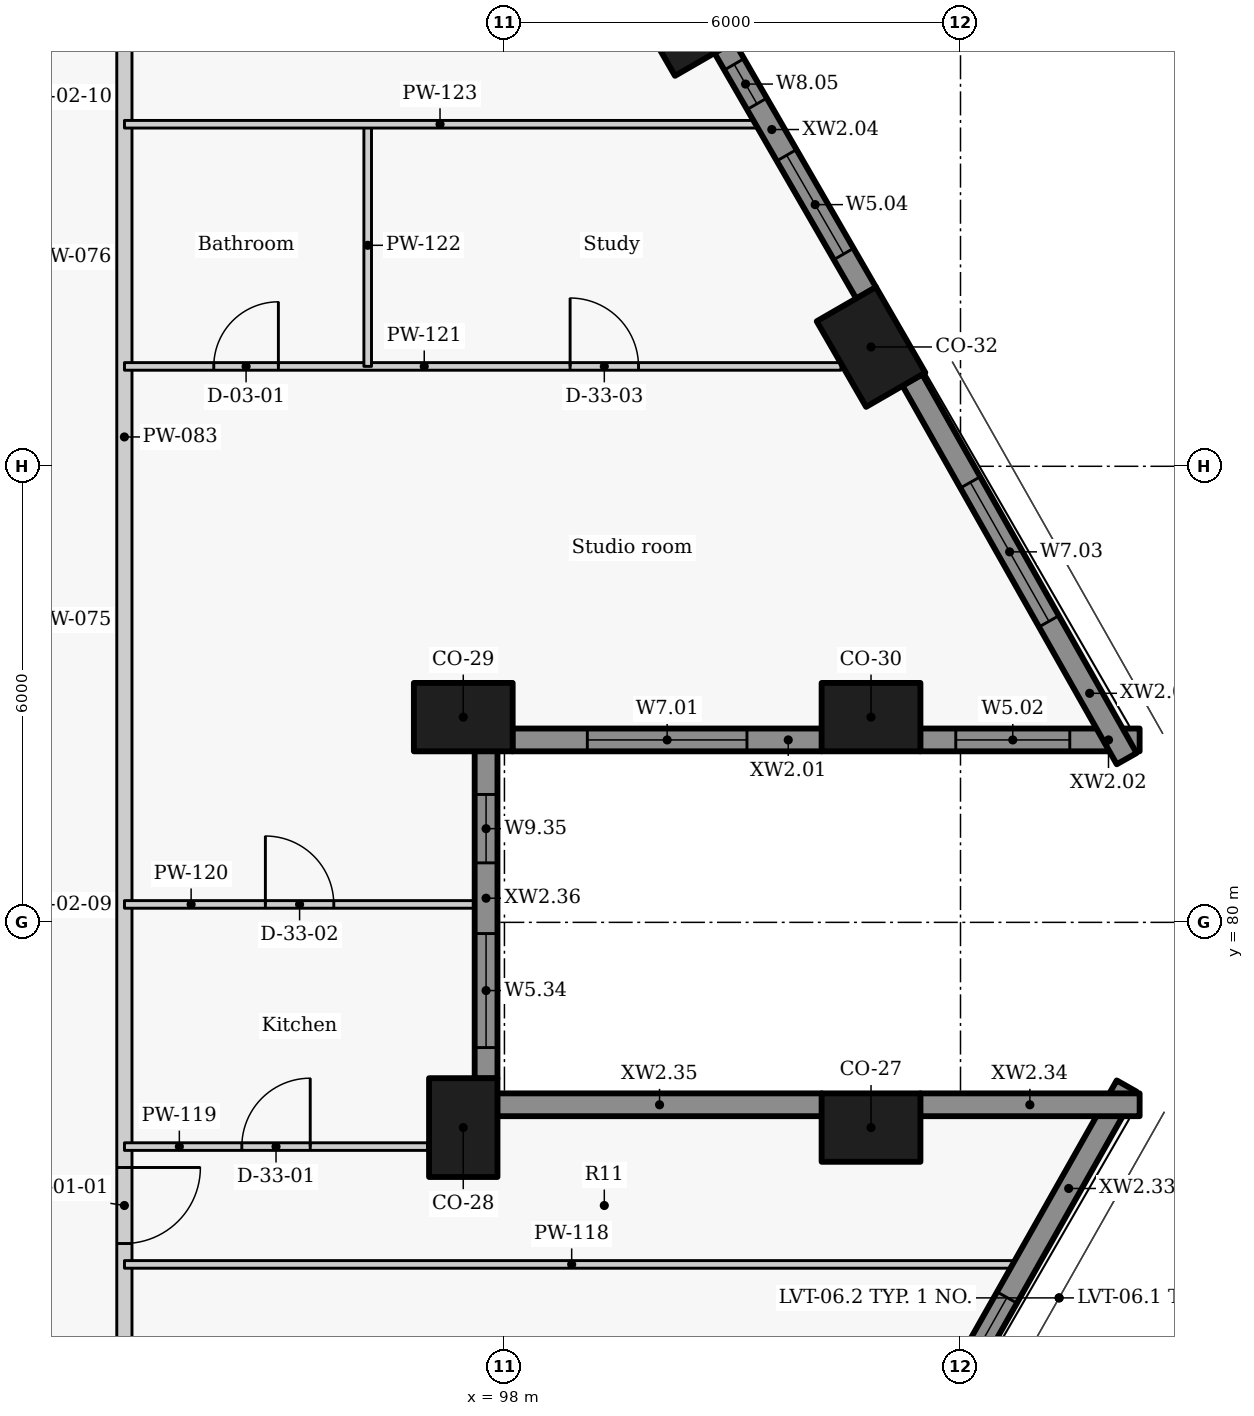
"""IFC4 building model, lengths in metres.
Left out: names, types, materials, properties, quantities, classifications, styles, units other than length and angle.
Written with IfcOpenShell. Run it as: python <this file> out.ifc"""

import sys

from ifc_helpers import new_model, si_unit, direction, frame, frame_2d, origin, origin_2d, place, context, subcontext, project, spatial, rectangle, extrude, element, fill, save


model = new_model("IFC4")
c1 = context("Model", 3, precision=1e-05, world=origin(), true_north=direction((0.0, 1.0)))
c2 = subcontext(c1, "Body", "Model", "MODEL_VIEW")
j1 = project(units=[si_unit("LENGTHUNIT", "METRE"), si_unit("PLANEANGLEUNIT", "RADIAN")], contexts=[c1])
p1 = place(None, origin())
s1 = spatial("IfcSite", under=j1, at=p1, CompositionType="ELEMENT")
p2 = place(p1, origin())
s2 = spatial("IfcBuilding", under=s1, at=p2, CompositionType="ELEMENT")
p3 = place(p2, frame((0.0, 0.0, 140.4)))
s3 = spatial("IfcBuildingStorey", under=s2, at=p3, CompositionType="ELEMENT", Elevation=140.4)
for number, where, z_axis, x_axis in (
    (1, (102.823, 77.3, 0.0), (0.0, 0.0, 1.0), (-1.0, 0.0, 0.0)),
    (2, (97.458, 77.3, 0.0), (0.0, 0.0, 1.0), (0.0, 1.0, 0.0)),
    (3, (97.458, 82.7, 0.0), (0.0, 0.0, 1.0), (1.0, 0.0, 0.0)),
    (4, (102.823, 82.7, 0.0), (0.0, 0.0, 1.0), (1.0, 0.0, 0.0)),
    (5, (102.823, 87.57, 0.0), (0.0, 0.0, 1.0), (-0.5, 0.866, 0.0)),
    (6, (100.308, 91.925, 0.0), (0.0, 0.0, 1.0), (-0.5, 0.866, 0.0)),
):
    element("IfcColumn", number, at=place(p3, frame(where, z_axis=z_axis, x_axis=x_axis)), inside=s3, PredefinedType="COLUMN", context=c2, shape_type="SweptSolid", body=[
        extrude(rectangle(XDim=1.3, YDim=0.9, at=origin_2d()), origin(), (0.0, 0.0, 1.0), 3.3),
    ])
p4 = place(p3, frame((98.104, 82.4, 0.0), z_axis=(0.0, 0.0, 1.0), x_axis=(1.0, 0.0, 0.0)))
e7 = element("IfcWall", 7, at=p4, inside=s3, PredefinedType="SOLIDWALL", context=c2, shape_type="SweptSolid", body=[
    extrude(rectangle(XDim=4.073, YDim=0.3, at=frame_2d((2.036, 0.0))), origin(), (0.0, 0.0, 1.0), 2.425),
])
p5 = place(p4, frame((0.986, 0.0, 0.9)))
e8 = element("IfcOpeningElement", 8, at=p5, cuts=e7, PredefinedType="OPENING", context=c2, shape_type="SweptSolid", body=[
    extrude(rectangle(XDim=2.1, YDim=1.1, at=frame_2d((1.05, 0.55))), frame((0.0, 0.16, 0.0), z_axis=(0.0, -1.0, 0.0), x_axis=(1.0, 0.0, 0.0)), (0.0, 0.0, 1.0), 0.32),
])
p6 = place(p3, frame((103.469, 82.4, 0.0), z_axis=(0.0, 0.0, 1.0), x_axis=(1.0, 0.0, 0.0)))
e9 = element("IfcWall", 9, at=p6, inside=s3, PredefinedType="SOLIDWALL", context=c2, shape_type="SweptSolid", body=[
    extrude(rectangle(XDim=2.888, YDim=0.3, at=frame_2d((1.444, 0.0))), origin(), (0.0, 0.0, 1.0), 2.425),
])
p7 = place(p6, frame((0.469, 0.0, 0.9)))
e10 = element("IfcOpeningElement", 10, at=p7, cuts=e9, PredefinedType="OPENING", context=c2, shape_type="SweptSolid", body=[
    extrude(rectangle(XDim=1.5, YDim=1.1, at=frame_2d((0.75, 0.55))), frame((0.0, 0.16, 0.0), z_axis=(0.0, -1.0, 0.0), x_axis=(1.0, 0.0, 0.0)), (0.0, 0.0, 1.0), 0.32),
])
p8 = place(p3, frame((106.186, 82.153, 0.0), z_axis=(0.0, 0.0, 1.0), x_axis=(-0.492498306264, 0.87031340236, 0.0)))
e11 = element("IfcWall", 11, at=p8, inside=s3, PredefinedType="SOLIDWALL", context=c2, shape_type="SweptSolid", body=[
    extrude(rectangle(XDim=5.727, YDim=0.3, at=frame_2d((2.863, 0.0))), origin(), (0.0, 0.0, 1.0), 2.425),
])
p9 = place(p8, frame((2.076, 0.0, 0.9)))
e12 = element("IfcOpeningElement", 12, at=p9, cuts=e11, PredefinedType="OPENING", context=c2, shape_type="SweptSolid", body=[
    extrude(rectangle(XDim=2.1, YDim=1.1, at=frame_2d((1.05, 0.55))), frame((0.0, 0.16, 0.0), z_axis=(0.0, -1.0, 0.0), x_axis=(1.0, 0.0, 0.0)), (0.0, 0.0, 1.0), 0.32),
])
p10 = place(p3, frame((102.76, 88.279, 0.0), z_axis=(0.0, 0.0, 1.0), x_axis=(-0.499933594891, 0.866063739398, 0.0)))
e13 = element("IfcWall", 13, at=p10, inside=s3, PredefinedType="SOLIDWALL", context=c2, shape_type="SweptSolid", body=[
    extrude(rectangle(XDim=3.737, YDim=0.3, at=frame_2d((1.868, 0.0))), origin(), (0.0, 0.0, 1.0), 2.425),
])
p11 = place(p10, frame((0.593, 0.0, 0.9)))
e14 = element("IfcOpeningElement", 14, at=p11, cuts=e13, PredefinedType="OPENING", context=c2, shape_type="SweptSolid", body=[
    extrude(rectangle(XDim=1.5, YDim=1.1, at=frame_2d((0.75, 0.55))), frame((0.0, 0.16, 0.0), z_axis=(0.0, -1.0, 0.0), x_axis=(1.0, 0.0, 0.0)), (0.0, 0.0, 1.0), 0.32),
])
p12 = place(p10, frame((2.875, 0.0, 0.9)))
e15 = element("IfcOpeningElement", 15, at=p12, cuts=e13, PredefinedType="OPENING", context=c2, shape_type="SweptSolid", body=[
    extrude(rectangle(XDim=0.6, YDim=1.1, at=frame_2d((0.3, 0.55))), frame((0.0, 0.16, 0.0), z_axis=(0.0, -1.0, 0.0), x_axis=(1.0, 0.0, 0.0)), (0.0, 0.0, 1.0), 0.32),
])
p13 = place(p3, frame((103.366, 72.863, 0.0), z_axis=(0.0, 0.0, 1.0), x_axis=(0.492498306264, 0.87031340236, 0.0)))
e16 = element("IfcWall", 16, at=p13, inside=s3, PredefinedType="SOLIDWALL", context=c2, shape_type="SweptSolid", body=[
    extrude(rectangle(XDim=5.727, YDim=0.3, at=frame_2d((2.863, 0.0))), origin(), (0.0, 0.0, 1.0), 2.425),
])
p14 = place(p13, frame((0.43, 0.0, 0.9)))
e17 = element("IfcOpeningElement", 17, at=p14, cuts=e16, PredefinedType="OPENING", context=c2, shape_type="SweptSolid", body=[
    extrude(rectangle(XDim=2.1, YDim=1.1, at=frame_2d((1.05, 0.55))), frame((0.0, 0.16, 0.0), z_axis=(0.0, -1.0, 0.0), x_axis=(1.0, 0.0, 0.0)), (0.0, 0.0, 1.0), 0.32),
])
p15 = place(p3, frame((106.357, 77.6, 0.0), z_axis=(0.0, 0.0, 1.0), x_axis=(-1.0, 0.0, 0.0)))
e18 = element("IfcWall", 18, at=p15, inside=s3, PredefinedType="SOLIDWALL", context=c2, shape_type="SweptSolid", body=[
    extrude(rectangle(XDim=2.888, YDim=0.3, at=frame_2d((1.444, 0.0))), origin(), (0.0, 0.0, 1.0), 2.425),
])
p16 = place(p3, frame((102.177, 77.6, 0.0), z_axis=(0.0, 0.0, 1.0), x_axis=(-1.0, 0.0, 0.0)))
e19 = element("IfcWall", 19, at=p16, inside=s3, PredefinedType="SOLIDWALL", context=c2, shape_type="SweptSolid", body=[
    extrude(rectangle(XDim=4.273, YDim=0.3, at=frame_2d((2.136, 0.0))), origin(), (0.0, 0.0, 1.0), 2.425),
])
p17 = place(p3, frame((97.758, 77.946, 0.0), z_axis=(0.0, 0.0, 1.0), x_axis=(0.0, 1.0, 0.0)))
e20 = element("IfcWall", 20, at=p17, inside=s3, PredefinedType="SOLIDWALL", context=c2, shape_type="SweptSolid", body=[
    extrude(rectangle(XDim=4.308, YDim=0.3, at=frame_2d((2.154, 0.0))), origin(), (0.0, 0.0, 1.0), 2.425),
])
p18 = place(p17, frame((0.407, 0.0, 0.9)))
e21 = element("IfcOpeningElement", 21, at=p18, cuts=e20, PredefinedType="OPENING", context=c2, shape_type="SweptSolid", body=[
    extrude(rectangle(XDim=1.5, YDim=1.1, at=frame_2d((0.75, 0.55))), frame((0.0, 0.16, 0.0), z_axis=(0.0, -1.0, 0.0), x_axis=(1.0, 0.0, 0.0)), (0.0, 0.0, 1.0), 0.32),
])
p19 = place(p17, frame((2.837, 0.0, 0.9)))
e22 = element("IfcOpeningElement", 22, at=p19, cuts=e20, PredefinedType="OPENING", context=c2, shape_type="SweptSolid", body=[
    extrude(rectangle(XDim=0.9, YDim=1.1, at=frame_2d((0.45, 0.55))), frame((0.0, 0.16, 0.0), z_axis=(0.0, -1.0, 0.0), x_axis=(1.0, 0.0, 0.0)), (0.0, 0.0, 1.0), 0.32),
])
p20 = place(p3, frame((93.0, 102.498, 0.0), z_axis=(0.0, 0.0, 1.0), x_axis=(0.0, -1.0, 0.0)))
e23 = element("IfcWall", 23, at=p20, inside=s3, PredefinedType="PARTITIONING", context=c2, shape_type="SweptSolid", body=[
    extrude(rectangle(XDim=45.665, YDim=0.2, at=frame_2d((22.833, 0.0))), origin(), (0.0, 0.0, 1.0), 2.405),
])
p21 = place(p20, frame((35.831, 0.0, 0.0)))
e24 = element("IfcOpeningElement", 24, at=p21, cuts=e23, PredefinedType="OPENING", context=c2, shape_type="SweptSolid", body=[
    extrude(rectangle(XDim=1.0, YDim=2.1, at=frame_2d((0.5, 1.05))), frame((0.0, 0.11, 0.0), z_axis=(0.0, -1.0, 0.0), x_axis=(1.0, 0.0, 0.0)), (0.0, 0.0, 1.0), 0.22),
])
p22 = place(p20, frame((25.723, 0.0, 0.0)))
e25 = element("IfcOpeningElement", 25, at=p22, cuts=e23, PredefinedType="OPENING", context=c2, shape_type="SweptSolid", body=[
    extrude(rectangle(XDim=1.0, YDim=2.1, at=frame_2d((0.5, 1.05))), frame((0.0, 0.11, 0.0), z_axis=(0.0, -1.0, 0.0), x_axis=(1.0, 0.0, 0.0)), (0.0, 0.0, 1.0), 0.22),
])
p23 = place(p20, frame((5.501, 0.0, 0.0)))
e26 = element("IfcOpeningElement", 26, at=p23, cuts=e23, PredefinedType="OPENING", context=c2, shape_type="SweptSolid", body=[
    extrude(rectangle(XDim=1.0, YDim=2.1, at=frame_2d((0.5, 1.05))), frame((0.0, 0.11, 0.0), z_axis=(0.0, -1.0, 0.0), x_axis=(1.0, 0.0, 0.0)), (0.0, 0.0, 1.0), 0.22),
])
p24 = place(p3, frame((93.001, 75.5, 0.0), z_axis=(0.0, 0.0, 1.0), x_axis=(1.0, 0.0, 0.0)))
e27 = element("IfcWall", 27, at=p24, inside=s3, PredefinedType="PARTITIONING", context=c2, shape_type="SweptSolid", body=[
    extrude(rectangle(XDim=11.767, YDim=0.1, at=frame_2d((5.884, 0.0))), origin(), (0.0, 0.0, 1.0), 2.405),
])
p25 = place(p3, frame((93.001, 77.05, 0.0), z_axis=(0.0, 0.0, 1.0), x_axis=(1.0, 0.0, 0.0)))
e28 = element("IfcWall", 28, at=p25, inside=s3, PredefinedType="PARTITIONING", context=c2, shape_type="SweptSolid", body=[
    extrude(rectangle(XDim=3.987, YDim=0.1, at=frame_2d((1.994, 0.0))), origin(), (0.0, 0.0, 1.0), 3.025),
])
p26 = place(p25, frame((1.544, 0.0, 0.0)))
e29 = element("IfcOpeningElement", 29, at=p26, cuts=e28, PredefinedType="OPENING", context=c2, shape_type="SweptSolid", body=[
    extrude(rectangle(XDim=0.9, YDim=2.1, at=frame_2d((0.45, 1.05))), frame((0.0, 0.06, 0.0), z_axis=(0.0, -1.0, 0.0), x_axis=(1.0, 0.0, 0.0)), (0.0, 0.0, 1.0), 0.12),
])
p27 = place(p3, frame((93.001, 80.236, 0.0), z_axis=(0.0, 0.0, 1.0), x_axis=(1.0, 0.0, 0.0)))
e30 = element("IfcWall", 30, at=p27, inside=s3, PredefinedType="PARTITIONING", context=c2, shape_type="SweptSolid", body=[
    extrude(rectangle(XDim=4.607, YDim=0.1, at=frame_2d((2.304, 0.0))), origin(), (0.0, 0.0, 1.0), 2.405),
])
p28 = place(p27, frame((1.854, 0.0, 0.0)))
e31 = element("IfcOpeningElement", 31, at=p28, cuts=e30, PredefinedType="OPENING", context=c2, shape_type="SweptSolid", body=[
    extrude(rectangle(XDim=0.9, YDim=2.1, at=frame_2d((0.45, 1.05))), frame((0.0, 0.06, 0.0), z_axis=(0.0, -1.0, 0.0), x_axis=(1.0, 0.0, 0.0)), (0.0, 0.0, 1.0), 0.12),
])
p29 = place(p3, frame((93.001, 87.314, 0.0), z_axis=(0.0, 0.0, 1.0), x_axis=(1.0, 0.0, 0.0)))
e32 = element("IfcWall", 32, at=p29, inside=s3, PredefinedType="PARTITIONING", context=c2, shape_type="SweptSolid", body=[
    extrude(rectangle(XDim=9.427, YDim=0.1, at=frame_2d((4.713, 0.0))), origin(), (0.0, 0.0, 1.0), 3.025),
])
p30 = place(p29, frame((1.175, 0.0, 0.0)))
e33 = element("IfcOpeningElement", 33, at=p30, cuts=e32, PredefinedType="OPENING", context=c2, shape_type="SweptSolid", body=[
    extrude(rectangle(XDim=0.85, YDim=2.1, at=frame_2d((0.425, 1.05))), frame((0.0, 0.06, 0.0), z_axis=(0.0, -1.0, 0.0), x_axis=(1.0, 0.0, 0.0)), (0.0, 0.0, 1.0), 0.12),
])
p31 = place(p29, frame((5.863, 0.0, 0.0)))
e34 = element("IfcOpeningElement", 34, at=p31, cuts=e32, PredefinedType="OPENING", context=c2, shape_type="SweptSolid", body=[
    extrude(rectangle(XDim=0.9, YDim=2.1, at=frame_2d((0.45, 1.05))), frame((0.0, 0.06, 0.0), z_axis=(0.0, -1.0, 0.0), x_axis=(1.0, 0.0, 0.0)), (0.0, 0.0, 1.0), 0.12),
])
p32 = place(p3, frame((96.201, 87.314, 0.0), z_axis=(0.0, 0.0, 1.0), x_axis=(0.0, 1.0, 0.0)))
e35 = element("IfcWall", 35, at=p32, inside=s3, PredefinedType="PARTITIONING", context=c2, shape_type="SweptSolid", body=[
    extrude(rectangle(XDim=3.186, YDim=0.1, at=frame_2d((1.593, 0.0))), origin(), (0.0, 0.0, 1.0), 3.025),
])
p33 = place(p3, frame((93.001, 90.5, 0.0), z_axis=(0.0, 0.0, 1.0), x_axis=(1.0, 0.0, 0.0)))
e36 = element("IfcWall", 36, at=p33, inside=s3, PredefinedType="PARTITIONING", context=c2, shape_type="SweptSolid", body=[
    extrude(rectangle(XDim=8.303, YDim=0.1, at=frame_2d((4.151, 0.0))), origin(), (0.0, 0.0, 1.0), 2.405),
])
p34 = place(p5, origin())
e37 = element("IfcWindow", 37, at=p34, inside=s3, PartitioningType="SINGLE_PANEL", PredefinedType="WINDOW", context=c2, shape_type="SweptSolid", body=[
    extrude(rectangle(XDim=2.1, YDim=1.1, at=frame_2d((1.05, 0.55))), frame((0.0, 0.03, 0.0), z_axis=(0.0, -1.0, 0.0), x_axis=(1.0, 0.0, 0.0)), (0.0, 0.0, 1.0), 0.06),
])
fill(e8, e37)
p35 = place(p7, origin())
e38 = element("IfcWindow", 38, at=p35, inside=s3, PartitioningType="SINGLE_PANEL", PredefinedType="WINDOW", context=c2, shape_type="SweptSolid", body=[
    extrude(rectangle(XDim=1.5, YDim=1.1, at=frame_2d((0.75, 0.55))), frame((0.0, 0.03, 0.0), z_axis=(0.0, -1.0, 0.0), x_axis=(1.0, 0.0, 0.0)), (0.0, 0.0, 1.0), 0.06),
])
fill(e10, e38)
p36 = place(p9, origin())
e39 = element("IfcWindow", 39, at=p36, inside=s3, PartitioningType="SINGLE_PANEL", PredefinedType="WINDOW", context=c2, shape_type="SweptSolid", body=[
    extrude(rectangle(XDim=2.1, YDim=1.1, at=frame_2d((1.05, 0.55))), frame((0.0, 0.03, 0.0), z_axis=(0.0, -1.0, 0.0), x_axis=(1.0, 0.0, 0.0)), (0.0, 0.0, 1.0), 0.06),
])
fill(e12, e39)
p37 = place(p11, origin())
e40 = element("IfcWindow", 40, at=p37, inside=s3, PartitioningType="SINGLE_PANEL", PredefinedType="WINDOW", context=c2, shape_type="SweptSolid", body=[
    extrude(rectangle(XDim=1.5, YDim=1.1, at=frame_2d((0.75, 0.55))), frame((0.0, 0.03, 0.0), z_axis=(0.0, -1.0, 0.0), x_axis=(1.0, 0.0, 0.0)), (0.0, 0.0, 1.0), 0.06),
])
fill(e14, e40)
p38 = place(p12, origin())
e41 = element("IfcWindow", 41, at=p38, inside=s3, PartitioningType="SINGLE_PANEL", PredefinedType="WINDOW", context=c2, shape_type="SweptSolid", body=[
    extrude(rectangle(XDim=0.6, YDim=1.1, at=frame_2d((0.3, 0.55))), frame((0.0, 0.03, 0.0), z_axis=(0.0, -1.0, 0.0), x_axis=(1.0, 0.0, 0.0)), (0.0, 0.0, 1.0), 0.06),
])
fill(e15, e41)
p39 = place(p14, origin())
e42 = element("IfcWindow", 42, at=p39, inside=s3, PartitioningType="SINGLE_PANEL", PredefinedType="WINDOW", context=c2, shape_type="SweptSolid", body=[
    extrude(rectangle(XDim=2.1, YDim=1.1, at=frame_2d((1.05, 0.55))), frame((0.0, 0.03, 0.0), z_axis=(0.0, -1.0, 0.0), x_axis=(1.0, 0.0, 0.0)), (0.0, 0.0, 1.0), 0.06),
])
fill(e17, e42)
p40 = place(p18, origin())
e43 = element("IfcWindow", 43, at=p40, inside=s3, PartitioningType="SINGLE_PANEL", PredefinedType="WINDOW", context=c2, shape_type="SweptSolid", body=[
    extrude(rectangle(XDim=1.5, YDim=1.1, at=frame_2d((0.75, 0.55))), frame((0.0, 0.03, 0.0), z_axis=(0.0, -1.0, 0.0), x_axis=(1.0, 0.0, 0.0)), (0.0, 0.0, 1.0), 0.06),
])
fill(e21, e43)
p41 = place(p19, origin())
e44 = element("IfcWindow", 44, at=p41, inside=s3, PartitioningType="SINGLE_PANEL", PredefinedType="WINDOW", context=c2, shape_type="SweptSolid", body=[
    extrude(rectangle(XDim=0.9, YDim=1.1, at=frame_2d((0.45, 0.55))), frame((0.0, 0.03, 0.0), z_axis=(0.0, -1.0, 0.0), x_axis=(1.0, 0.0, 0.0)), (0.0, 0.0, 1.0), 0.06),
])
fill(e22, e44)
p42 = place(p22, origin())
e45 = element("IfcDoor", 45, at=p42, inside=s3, OperationType="SINGLE_SWING_LEFT", PredefinedType="DOOR", context=c2, shape_type="SweptSolid", body=[
    extrude(rectangle(XDim=1.0, YDim=2.1, at=frame_2d((0.5, 1.05))), frame((0.0, 0.025, 0.0), z_axis=(0.0, -1.0, 0.0), x_axis=(1.0, 0.0, 0.0)), (0.0, 0.0, 1.0), 0.05),
])
fill(e25, e45)
p43 = place(p26, origin())
e46 = element("IfcDoor", 46, at=p43, inside=s3, OperationType="SINGLE_SWING_RIGHT", PredefinedType="DOOR", context=c2, shape_type="SweptSolid", body=[
    extrude(rectangle(XDim=0.9, YDim=2.1, at=frame_2d((0.45, 1.05))), frame((0.0, 0.025, 0.0), z_axis=(0.0, -1.0, 0.0), x_axis=(1.0, 0.0, 0.0)), (0.0, 0.0, 1.0), 0.05),
])
fill(e29, e46)
p44 = place(p28, origin())
e47 = element("IfcDoor", 47, at=p44, inside=s3, OperationType="SINGLE_SWING_LEFT", PredefinedType="DOOR", context=c2, shape_type="SweptSolid", body=[
    extrude(rectangle(XDim=0.9, YDim=2.1, at=frame_2d((0.45, 1.05))), frame((0.0, 0.025, 0.0), z_axis=(0.0, -1.0, 0.0), x_axis=(1.0, 0.0, 0.0)), (0.0, 0.0, 1.0), 0.05),
])
fill(e31, e47)
p45 = place(p30, origin())
e48 = element("IfcDoor", 48, at=p45, inside=s3, OperationType="SINGLE_SWING_RIGHT", PredefinedType="DOOR", context=c2, shape_type="SweptSolid", body=[
    extrude(rectangle(XDim=0.85, YDim=2.1, at=frame_2d((0.425, 1.05))), frame((0.0, 0.025, 0.0), z_axis=(0.0, -1.0, 0.0), x_axis=(1.0, 0.0, 0.0)), (0.0, 0.0, 1.0), 0.05),
])
fill(e33, e48)
p46 = place(p31, origin())
e49 = element("IfcDoor", 49, at=p46, inside=s3, OperationType="SINGLE_SWING_LEFT", PredefinedType="DOOR", context=c2, shape_type="SweptSolid", body=[
    extrude(rectangle(XDim=0.9, YDim=2.1, at=frame_2d((0.45, 1.05))), frame((0.0, 0.025, 0.0), z_axis=(0.0, -1.0, 0.0), x_axis=(1.0, 0.0, 0.0)), (0.0, 0.0, 1.0), 0.05),
])
fill(e34, e49)
save(model, sys.argv[1])
